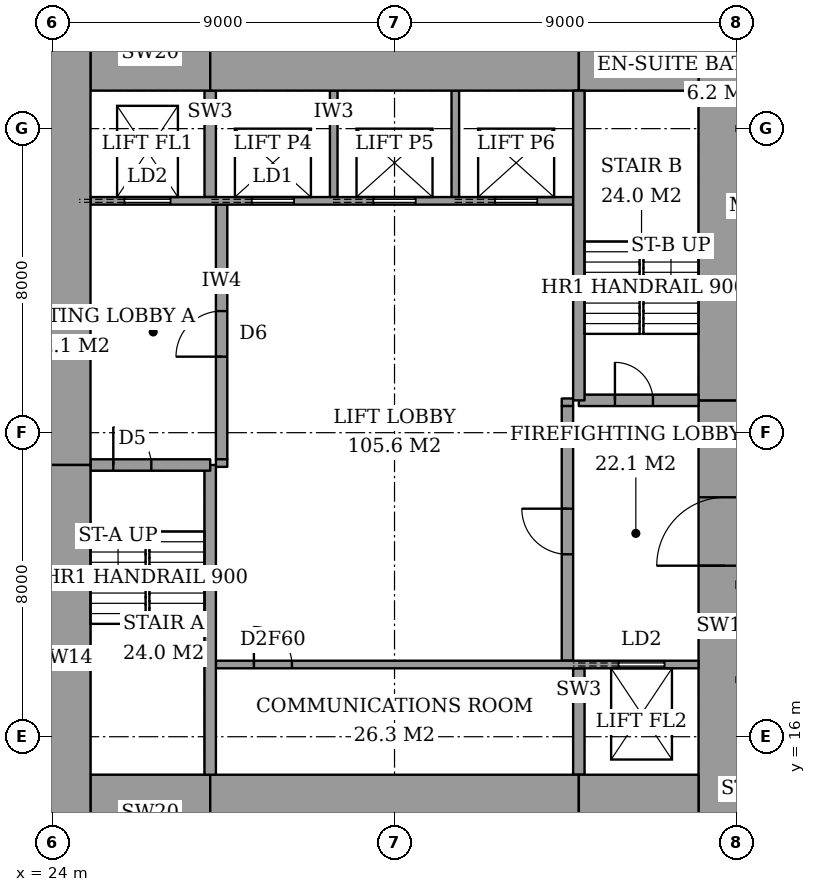
"""IFC4 building model, lengths in metres.
Left out: names, types, materials, properties, quantities, classifications, styles, units other than length and angle.
Written with IfcOpenShell. Run it as: python <this file> out.ifc"""

import sys

from ifc_helpers import new_model, si_unit, direction, frame, frame_2d, origin, place, context, subcontext, project, spatial, rectangle, extrude, element, fill, save


model = new_model("IFC4")
c1 = context("Model", 3, precision=1e-05, world=origin(), true_north=direction((0.0, 1.0)))
c2 = subcontext(c1, "Body", "Model", "MODEL_VIEW")
j1 = project(units=[si_unit("LENGTHUNIT", "METRE"), si_unit("PLANEANGLEUNIT", "RADIAN")], contexts=[c1])
p1 = place(None, origin())
s1 = spatial("IfcSite", under=j1, at=p1, CompositionType="ELEMENT")
p2 = place(p1, origin())
s2 = spatial("IfcBuilding", under=s1, at=p2, CompositionType="ELEMENT")
p3 = place(p2, frame((0.0, 0.0, 234.0)))
s3 = spatial("IfcBuildingStorey", under=s2, at=p3, CompositionType="ELEMENT", Elevation=234.0)
p4 = place(p3, frame((25.0, 14.0, 0.0), z_axis=(0.0, 0.0, 1.0), x_axis=(1.0, 0.0, 0.0)))
e1 = element("IfcWall", 1, at=p4, inside=s3, PredefinedType="SHEAR", context=c2, shape_type="SweptSolid", body=[
    extrude(rectangle(XDim=3.15, YDim=2.0, at=frame_2d((1.575, 0.0))), origin(), (0.0, 0.0, 1.0), 3.6),
])
p5 = place(p3, frame((28.15, 14.0, 0.0), z_axis=(0.0, 0.0, 1.0), x_axis=(1.0, 0.0, 0.0)))
e2 = element("IfcWall", 2, at=p5, inside=s3, PredefinedType="SHEAR", context=c2, shape_type="SweptSolid", body=[
    extrude(rectangle(XDim=9.7, YDim=2.0, at=frame_2d((4.85, 0.0))), origin(), (0.0, 0.0, 1.0), 3.6),
])
for number, where, z_axis, x_axis in (
    (3, (37.85, 14.0, 0.0), (0.0, 0.0, 1.0), (1.0, 0.0, 0.0)),
    (4, (25.0, 34.0, 0.0), (0.0, 0.0, 1.0), (1.0, 0.0, 0.0)),
):
    element("IfcWall", number, at=place(p3, frame(where, z_axis=z_axis, x_axis=x_axis)), inside=s3, PredefinedType="SHEAR", context=c2, shape_type="SweptSolid", body=[
        extrude(rectangle(XDim=3.15, YDim=2.0, at=frame_2d((1.575, 0.0))), origin(), (0.0, 0.0, 1.0), 3.6),
    ])
p6 = place(p3, frame((28.15, 34.0, 0.0), z_axis=(0.0, 0.0, 1.0), x_axis=(1.0, 0.0, 0.0)))
e5 = element("IfcWall", 5, at=p6, inside=s3, PredefinedType="SHEAR", context=c2, shape_type="SweptSolid", body=[
    extrude(rectangle(XDim=9.7, YDim=2.0, at=frame_2d((4.85, 0.0))), origin(), (0.0, 0.0, 1.0), 3.6),
])
p7 = place(p3, frame((37.85, 34.0, 0.0), z_axis=(0.0, 0.0, 1.0), x_axis=(1.0, 0.0, 0.0)))
e6 = element("IfcWall", 6, at=p7, inside=s3, PredefinedType="SHEAR", context=c2, shape_type="SweptSolid", body=[
    extrude(rectangle(XDim=3.15, YDim=2.0, at=frame_2d((1.575, 0.0))), origin(), (0.0, 0.0, 1.0), 3.6),
])
p8 = place(p3, frame((24.3, 13.0, 0.0), z_axis=(0.0, 0.0, 1.0), x_axis=(0.0, 1.0, 0.0)))
e7 = element("IfcWall", 7, at=p8, inside=s3, PredefinedType="SHEAR", context=c2, shape_type="SweptSolid", body=[
    extrude(rectangle(XDim=10.15, YDim=1.4, at=frame_2d((5.075, 0.0))), origin(), (0.0, 0.0, 1.0), 3.6),
])
p9 = place(p3, frame((24.3, 23.15, 0.0), z_axis=(0.0, 0.0, 1.0), x_axis=(0.0, 1.0, 0.0)))
e8 = element("IfcWall", 8, at=p9, inside=s3, PredefinedType="SHEAR", context=c2, shape_type="SweptSolid", body=[
    extrude(rectangle(XDim=11.85, YDim=1.4, at=frame_2d((5.925, 0.0))), origin(), (0.0, 0.0, 1.0), 3.6),
])
p10 = place(p3, frame((41.7, 13.0, 0.0), z_axis=(0.0, 0.0, 1.0), x_axis=(0.0, 1.0, 0.0)))
e9 = element("IfcWall", 9, at=p10, inside=s3, PredefinedType="SHEAR", context=c2, shape_type="SweptSolid", body=[
    extrude(rectangle(XDim=11.85, YDim=1.4, at=frame_2d((5.925, 0.0))), origin(), (0.0, 0.0, 1.0), 3.6),
])
p11 = place(p10, frame((7.5, 0.0, 0.0)))
e10 = element("IfcOpeningElement", 10, at=p11, cuts=e9, PredefinedType="OPENING", context=c2, shape_type="SweptSolid", body=[
    extrude(rectangle(XDim=1.8, YDim=2.4, at=frame_2d((0.9, 1.2))), frame((0.0, 0.71, 0.0), z_axis=(0.0, -1.0, 0.0), x_axis=(1.0, 0.0, 0.0)), (0.0, 0.0, 1.0), 1.42),
])
p12 = place(p3, frame((41.7, 24.85, 0.0), z_axis=(0.0, 0.0, 1.0), x_axis=(0.0, 1.0, 0.0)))
e11 = element("IfcWall", 11, at=p12, inside=s3, PredefinedType="SHEAR", context=c2, shape_type="SweptSolid", body=[
    extrude(rectangle(XDim=10.15, YDim=1.4, at=frame_2d((5.075, 0.0))), origin(), (0.0, 0.0, 1.0), 3.6),
])
p13 = place(p3, frame((28.15, 15.0, 0.0), z_axis=(0.0, 0.0, 1.0), x_axis=(0.0, 1.0, 0.0)))
e12 = element("IfcWall", 12, at=p13, inside=s3, PredefinedType="SHEAR", context=c2, shape_type="SweptSolid", body=[
    extrude(rectangle(XDim=8.15, YDim=0.3, at=frame_2d((4.075, 0.0))), origin(), (0.0, 0.0, 1.0), 3.6),
])
p14 = place(p3, frame((25.0, 23.15, 0.0), z_axis=(0.0, 0.0, 1.0), x_axis=(1.0, 0.0, 0.0)))
e13 = element("IfcWall", 13, at=p14, inside=s3, PredefinedType="SHEAR", context=c2, shape_type="SweptSolid", body=[
    extrude(rectangle(XDim=3.15, YDim=0.3, at=frame_2d((1.575, 0.0))), origin(), (0.0, 0.0, 1.0), 3.6),
])
p15 = place(p14, frame((0.6, 0.0, 0.0)))
e14 = element("IfcOpeningElement", 14, at=p15, cuts=e13, PredefinedType="OPENING", context=c2, shape_type="SweptSolid", body=[
    extrude(rectangle(XDim=1.0, YDim=2.1, at=frame_2d((0.5, 1.05))), frame((0.0, 0.16, 0.0), z_axis=(0.0, -1.0, 0.0), x_axis=(1.0, 0.0, 0.0)), (0.0, 0.0, 1.0), 0.32),
])
p16 = place(p3, frame((37.85, 24.85, 0.0), z_axis=(0.0, 0.0, 1.0), x_axis=(0.0, 1.0, 0.0)))
e15 = element("IfcWall", 15, at=p16, inside=s3, PredefinedType="SHEAR", context=c2, shape_type="SweptSolid", body=[
    extrude(rectangle(XDim=8.15, YDim=0.3, at=frame_2d((4.075, 0.0))), origin(), (0.0, 0.0, 1.0), 3.6),
])
p17 = place(p3, frame((37.85, 24.85, 0.0), z_axis=(0.0, 0.0, 1.0), x_axis=(1.0, 0.0, 0.0)))
e16 = element("IfcWall", 16, at=p17, inside=s3, PredefinedType="SHEAR", context=c2, shape_type="SweptSolid", body=[
    extrude(rectangle(XDim=3.15, YDim=0.3, at=frame_2d((1.575, 0.0))), origin(), (0.0, 0.0, 1.0), 3.6),
])
p18 = place(p17, frame((0.95, 0.0, 0.0)))
e17 = element("IfcOpeningElement", 17, at=p18, cuts=e16, PredefinedType="OPENING", context=c2, shape_type="SweptSolid", body=[
    extrude(rectangle(XDim=1.0, YDim=2.1, at=frame_2d((0.5, 1.05))), frame((0.0, 0.16, 0.0), z_axis=(0.0, -1.0, 0.0), x_axis=(1.0, 0.0, 0.0)), (0.0, 0.0, 1.0), 0.32),
])
p19 = place(p3, frame((28.45, 23.3, 0.0), z_axis=(0.0, 0.0, 1.0), x_axis=(0.0, 1.0, 0.0)))
e18 = element("IfcWall", 18, at=p19, inside=s3, PredefinedType="PARTITIONING", context=c2, shape_type="SweptSolid", body=[
    extrude(rectangle(XDim=6.7, YDim=0.3, at=frame_2d((3.35, 0.0))), origin(), (0.0, 0.0, 1.0), 3.6),
])
p20 = place(p19, frame((2.7, 0.0, 0.0)))
e19 = element("IfcOpeningElement", 19, at=p20, cuts=e18, PredefinedType="OPENING", context=c2, shape_type="SweptSolid", body=[
    extrude(rectangle(XDim=1.2, YDim=2.1, at=frame_2d((0.6, 1.05))), frame((0.0, 0.16, 0.0), z_axis=(0.0, -1.0, 0.0), x_axis=(1.0, 0.0, 0.0)), (0.0, 0.0, 1.0), 0.32),
])
p21 = place(p3, frame((37.55, 18.0, 0.0), z_axis=(0.0, 0.0, 1.0), x_axis=(0.0, 1.0, 0.0)))
e20 = element("IfcWall", 20, at=p21, inside=s3, PredefinedType="PARTITIONING", context=c2, shape_type="SweptSolid", body=[
    extrude(rectangle(XDim=6.7, YDim=0.3, at=frame_2d((3.35, 0.0))), origin(), (0.0, 0.0, 1.0), 3.6),
])
p22 = place(p21, frame((2.8, 0.0, 0.0)))
e21 = element("IfcOpeningElement", 21, at=p22, cuts=e20, PredefinedType="OPENING", context=c2, shape_type="SweptSolid", body=[
    extrude(rectangle(XDim=1.2, YDim=2.1, at=frame_2d((0.6, 1.05))), frame((0.0, 0.16, 0.0), z_axis=(0.0, -1.0, 0.0), x_axis=(1.0, 0.0, 0.0)), (0.0, 0.0, 1.0), 0.32),
])
p23 = place(p3, frame((28.3, 17.9, 0.0), z_axis=(0.0, 0.0, 1.0), x_axis=(1.0, 0.0, 0.0)))
e22 = element("IfcWall", 22, at=p23, inside=s3, PredefinedType="PARTITIONING", context=c2, shape_type="SweptSolid", body=[
    extrude(rectangle(XDim=12.7, YDim=0.2, at=frame_2d((6.35, 0.0))), origin(), (0.0, 0.0, 1.0), 3.6),
])
p24 = place(p23, frame((1.0, 0.0, 0.0)))
e23 = element("IfcOpeningElement", 23, at=p24, cuts=e22, PredefinedType="OPENING", context=c2, shape_type="SweptSolid", body=[
    extrude(rectangle(XDim=1.0, YDim=2.1, at=frame_2d((0.5, 1.05))), frame((0.0, 0.11, 0.0), z_axis=(0.0, -1.0, 0.0), x_axis=(1.0, 0.0, 0.0)), (0.0, 0.0, 1.0), 0.22),
])
p25 = place(p23, frame((10.6, 0.0, 0.0)))
e24 = element("IfcOpeningElement", 24, at=p25, cuts=e22, PredefinedType="OPENING", context=c2, shape_type="SweptSolid", body=[
    extrude(rectangle(XDim=1.2, YDim=2.1, at=frame_2d((0.6, 1.05))), frame((0.0, 0.11, 0.0), z_axis=(0.0, -1.0, 0.0), x_axis=(1.0, 0.0, 0.0)), (0.0, 0.0, 1.0), 0.22),
])
p26 = place(p3, frame((25.0, 30.1, 0.0), z_axis=(0.0, 0.0, 1.0), x_axis=(1.0, 0.0, 0.0)))
e25 = element("IfcWall", 25, at=p26, inside=s3, PredefinedType="PARTITIONING", context=c2, shape_type="SweptSolid", body=[
    extrude(rectangle(XDim=12.7, YDim=0.2, at=frame_2d((6.35, 0.0))), origin(), (0.0, 0.0, 1.0), 3.6),
])
p27 = place(p26, frame((4.25, 0.0, 0.0)))
e26 = element("IfcOpeningElement", 26, at=p27, cuts=e25, PredefinedType="OPENING", context=c2, shape_type="SweptSolid", body=[
    extrude(rectangle(XDim=1.1, YDim=2.1, at=frame_2d((0.55, 1.05))), frame((0.0, 0.11, 0.0), z_axis=(0.0, -1.0, 0.0), x_axis=(1.0, 0.0, 0.0)), (0.0, 0.0, 1.0), 0.22),
])
p28 = place(p26, frame((7.45, 0.0, 0.0)))
e27 = element("IfcOpeningElement", 27, at=p28, cuts=e25, PredefinedType="OPENING", context=c2, shape_type="SweptSolid", body=[
    extrude(rectangle(XDim=1.1, YDim=2.1, at=frame_2d((0.55, 1.05))), frame((0.0, 0.11, 0.0), z_axis=(0.0, -1.0, 0.0), x_axis=(1.0, 0.0, 0.0)), (0.0, 0.0, 1.0), 0.22),
])
p29 = place(p26, frame((10.65, 0.0, 0.0)))
e28 = element("IfcOpeningElement", 28, at=p29, cuts=e25, PredefinedType="OPENING", context=c2, shape_type="SweptSolid", body=[
    extrude(rectangle(XDim=1.1, YDim=2.1, at=frame_2d((0.55, 1.05))), frame((0.0, 0.11, 0.0), z_axis=(0.0, -1.0, 0.0), x_axis=(1.0, 0.0, 0.0)), (0.0, 0.0, 1.0), 0.22),
])
p30 = place(p26, frame((0.9, 0.0, 0.0)))
e29 = element("IfcOpeningElement", 29, at=p30, cuts=e25, PredefinedType="OPENING", context=c2, shape_type="SweptSolid", body=[
    extrude(rectangle(XDim=1.2, YDim=2.1, at=frame_2d((0.6, 1.05))), frame((0.0, 0.11, 0.0), z_axis=(0.0, -1.0, 0.0), x_axis=(1.0, 0.0, 0.0)), (0.0, 0.0, 1.0), 0.22),
])
p31 = place(p3, frame((37.85, 15.0, 0.0), z_axis=(0.0, 0.0, 1.0), x_axis=(0.0, 1.0, 0.0)))
e30 = element("IfcWall", 30, at=p31, inside=s3, PredefinedType="SHEAR", context=c2, shape_type="SweptSolid", body=[
    extrude(rectangle(XDim=2.8, YDim=0.3, at=frame_2d((1.4, 0.0))), origin(), (0.0, 0.0, 1.0), 3.6),
])
for number, where, z_axis, x_axis in (
    (31, (31.4, 30.2, 0.0), (0.0, 0.0, 1.0), (0.0, 1.0, 0.0)),
    (32, (34.6, 30.2, 0.0), (0.0, 0.0, 1.0), (0.0, 1.0, 0.0)),
):
    element("IfcWall", number, at=place(p3, frame(where, z_axis=z_axis, x_axis=x_axis)), inside=s3, PredefinedType="PARTITIONING", context=c2, shape_type="SweptSolid", body=[
        extrude(rectangle(XDim=2.8, YDim=0.2, at=frame_2d((1.4, 0.0))), origin(), (0.0, 0.0, 1.0), 3.6),
    ])
p32 = place(p3, frame((28.15, 30.2, 0.0), z_axis=(0.0, 0.0, 1.0), x_axis=(0.0, 1.0, 0.0)))
e33 = element("IfcWall", 33, at=p32, inside=s3, PredefinedType="SHEAR", context=c2, shape_type="SweptSolid", body=[
    extrude(rectangle(XDim=2.8, YDim=0.3, at=frame_2d((1.4, 0.0))), origin(), (0.0, 0.0, 1.0), 3.6),
])
for number, where, z_axis, x_axis in (
    (34, (28.3, 23.2, 0.0), (0.0, 0.0, 1.0), (1.0, 0.0, 0.0)),
    (35, (37.4, 24.8, 0.0), (0.0, 0.0, 1.0), (1.0, 0.0, 0.0)),
):
    element("IfcWall", number, at=place(p3, frame(where, z_axis=z_axis, x_axis=x_axis)), inside=s3, PredefinedType="PARTITIONING", context=c2, shape_type="SweptSolid", body=[
        extrude(rectangle(XDim=0.3, YDim=0.2, at=frame_2d((0.15, 0.0))), origin(), (0.0, 0.0, 1.0), 3.6),
    ])
p33 = place(p15, origin())
e36 = element("IfcDoor", 36, at=p33, inside=s3, OperationType="SINGLE_SWING_RIGHT", PredefinedType="DOOR", context=c2, shape_type="SweptSolid", body=[
    extrude(rectangle(XDim=1.0, YDim=2.1, at=frame_2d((0.5, 1.05))), frame((0.0, 0.025, 0.0), z_axis=(0.0, -1.0, 0.0), x_axis=(1.0, 0.0, 0.0)), (0.0, 0.0, 1.0), 0.05),
])
fill(e14, e36)
p34 = place(p18, origin())
e37 = element("IfcDoor", 37, at=p34, inside=s3, OperationType="SINGLE_SWING_RIGHT", PredefinedType="DOOR", context=c2, shape_type="SweptSolid", body=[
    extrude(rectangle(XDim=1.0, YDim=2.1, at=frame_2d((0.5, 1.05))), frame((0.0, 0.025, 0.0), z_axis=(0.0, -1.0, 0.0), x_axis=(1.0, 0.0, 0.0)), (0.0, 0.0, 1.0), 0.05),
])
fill(e17, e37)
p35 = place(p20, origin())
e38 = element("IfcDoor", 38, at=p35, inside=s3, OperationType="SINGLE_SWING_RIGHT", PredefinedType="DOOR", context=c2, shape_type="SweptSolid", body=[
    extrude(rectangle(XDim=1.2, YDim=2.1, at=frame_2d((0.6, 1.05))), frame((0.0, 0.025, 0.0), z_axis=(0.0, -1.0, 0.0), x_axis=(1.0, 0.0, 0.0)), (0.0, 0.0, 1.0), 0.05),
])
fill(e19, e38)
p36 = place(p22, origin())
e39 = element("IfcDoor", 39, at=p36, inside=s3, OperationType="SINGLE_SWING_LEFT", PredefinedType="DOOR", context=c2, shape_type="SweptSolid", body=[
    extrude(rectangle(XDim=1.2, YDim=2.1, at=frame_2d((0.6, 1.05))), frame((0.0, 0.025, 0.0), z_axis=(0.0, -1.0, 0.0), x_axis=(1.0, 0.0, 0.0)), (0.0, 0.0, 1.0), 0.05),
])
fill(e21, e39)
p37 = place(p11, origin())
e40 = element("IfcDoor", 40, at=p37, inside=s3, OperationType="DOUBLE_DOOR_DOUBLE_SWING", PredefinedType="DOOR", context=c2, shape_type="SweptSolid", body=[
    extrude(rectangle(XDim=1.8, YDim=2.4, at=frame_2d((0.9, 1.2))), frame((0.0, 0.025, 0.0), z_axis=(0.0, -1.0, 0.0), x_axis=(1.0, 0.0, 0.0)), (0.0, 0.0, 1.0), 0.05),
])
fill(e10, e40)
p38 = place(p24, origin())
e41 = element("IfcDoor", 41, at=p38, inside=s3, OperationType="SINGLE_SWING_RIGHT", PredefinedType="DOOR", context=c2, shape_type="SweptSolid", body=[
    extrude(rectangle(XDim=1.0, YDim=2.1, at=frame_2d((0.5, 1.05))), frame((0.0, 0.025, 0.0), z_axis=(0.0, -1.0, 0.0), x_axis=(1.0, 0.0, 0.0)), (0.0, 0.0, 1.0), 0.05),
])
fill(e23, e41)
p39 = place(p27, origin())
e42 = element("IfcDoor", 42, at=p39, inside=s3, OperationType="SLIDING_TO_LEFT", PredefinedType="DOOR", context=c2, shape_type="SweptSolid", body=[
    extrude(rectangle(XDim=1.1, YDim=2.1, at=frame_2d((0.55, 1.05))), frame((0.0, 0.025, 0.0), z_axis=(0.0, -1.0, 0.0), x_axis=(1.0, 0.0, 0.0)), (0.0, 0.0, 1.0), 0.05),
])
fill(e26, e42)
p40 = place(p28, origin())
e43 = element("IfcDoor", 43, at=p40, inside=s3, OperationType="SLIDING_TO_LEFT", PredefinedType="DOOR", context=c2, shape_type="SweptSolid", body=[
    extrude(rectangle(XDim=1.1, YDim=2.1, at=frame_2d((0.55, 1.05))), frame((0.0, 0.025, 0.0), z_axis=(0.0, -1.0, 0.0), x_axis=(1.0, 0.0, 0.0)), (0.0, 0.0, 1.0), 0.05),
])
fill(e27, e43)
p41 = place(p29, origin())
e44 = element("IfcDoor", 44, at=p41, inside=s3, OperationType="SLIDING_TO_LEFT", PredefinedType="DOOR", context=c2, shape_type="SweptSolid", body=[
    extrude(rectangle(XDim=1.1, YDim=2.1, at=frame_2d((0.55, 1.05))), frame((0.0, 0.025, 0.0), z_axis=(0.0, -1.0, 0.0), x_axis=(1.0, 0.0, 0.0)), (0.0, 0.0, 1.0), 0.05),
])
fill(e28, e44)
p42 = place(p30, origin())
e45 = element("IfcDoor", 45, at=p42, inside=s3, OperationType="SLIDING_TO_LEFT", PredefinedType="DOOR", context=c2, shape_type="SweptSolid", body=[
    extrude(rectangle(XDim=1.2, YDim=2.1, at=frame_2d((0.6, 1.05))), frame((0.0, 0.025, 0.0), z_axis=(0.0, -1.0, 0.0), x_axis=(1.0, 0.0, 0.0)), (0.0, 0.0, 1.0), 0.05),
])
fill(e29, e45)
p43 = place(p25, origin())
e46 = element("IfcDoor", 46, at=p43, inside=s3, OperationType="SLIDING_TO_LEFT", PredefinedType="DOOR", context=c2, shape_type="SweptSolid", body=[
    extrude(rectangle(XDim=1.2, YDim=2.1, at=frame_2d((0.6, 1.05))), frame((0.0, 0.025, 0.0), z_axis=(0.0, -1.0, 0.0), x_axis=(1.0, 0.0, 0.0)), (0.0, 0.0, 1.0), 0.05),
])
fill(e24, e46)
save(model, sys.argv[1])
